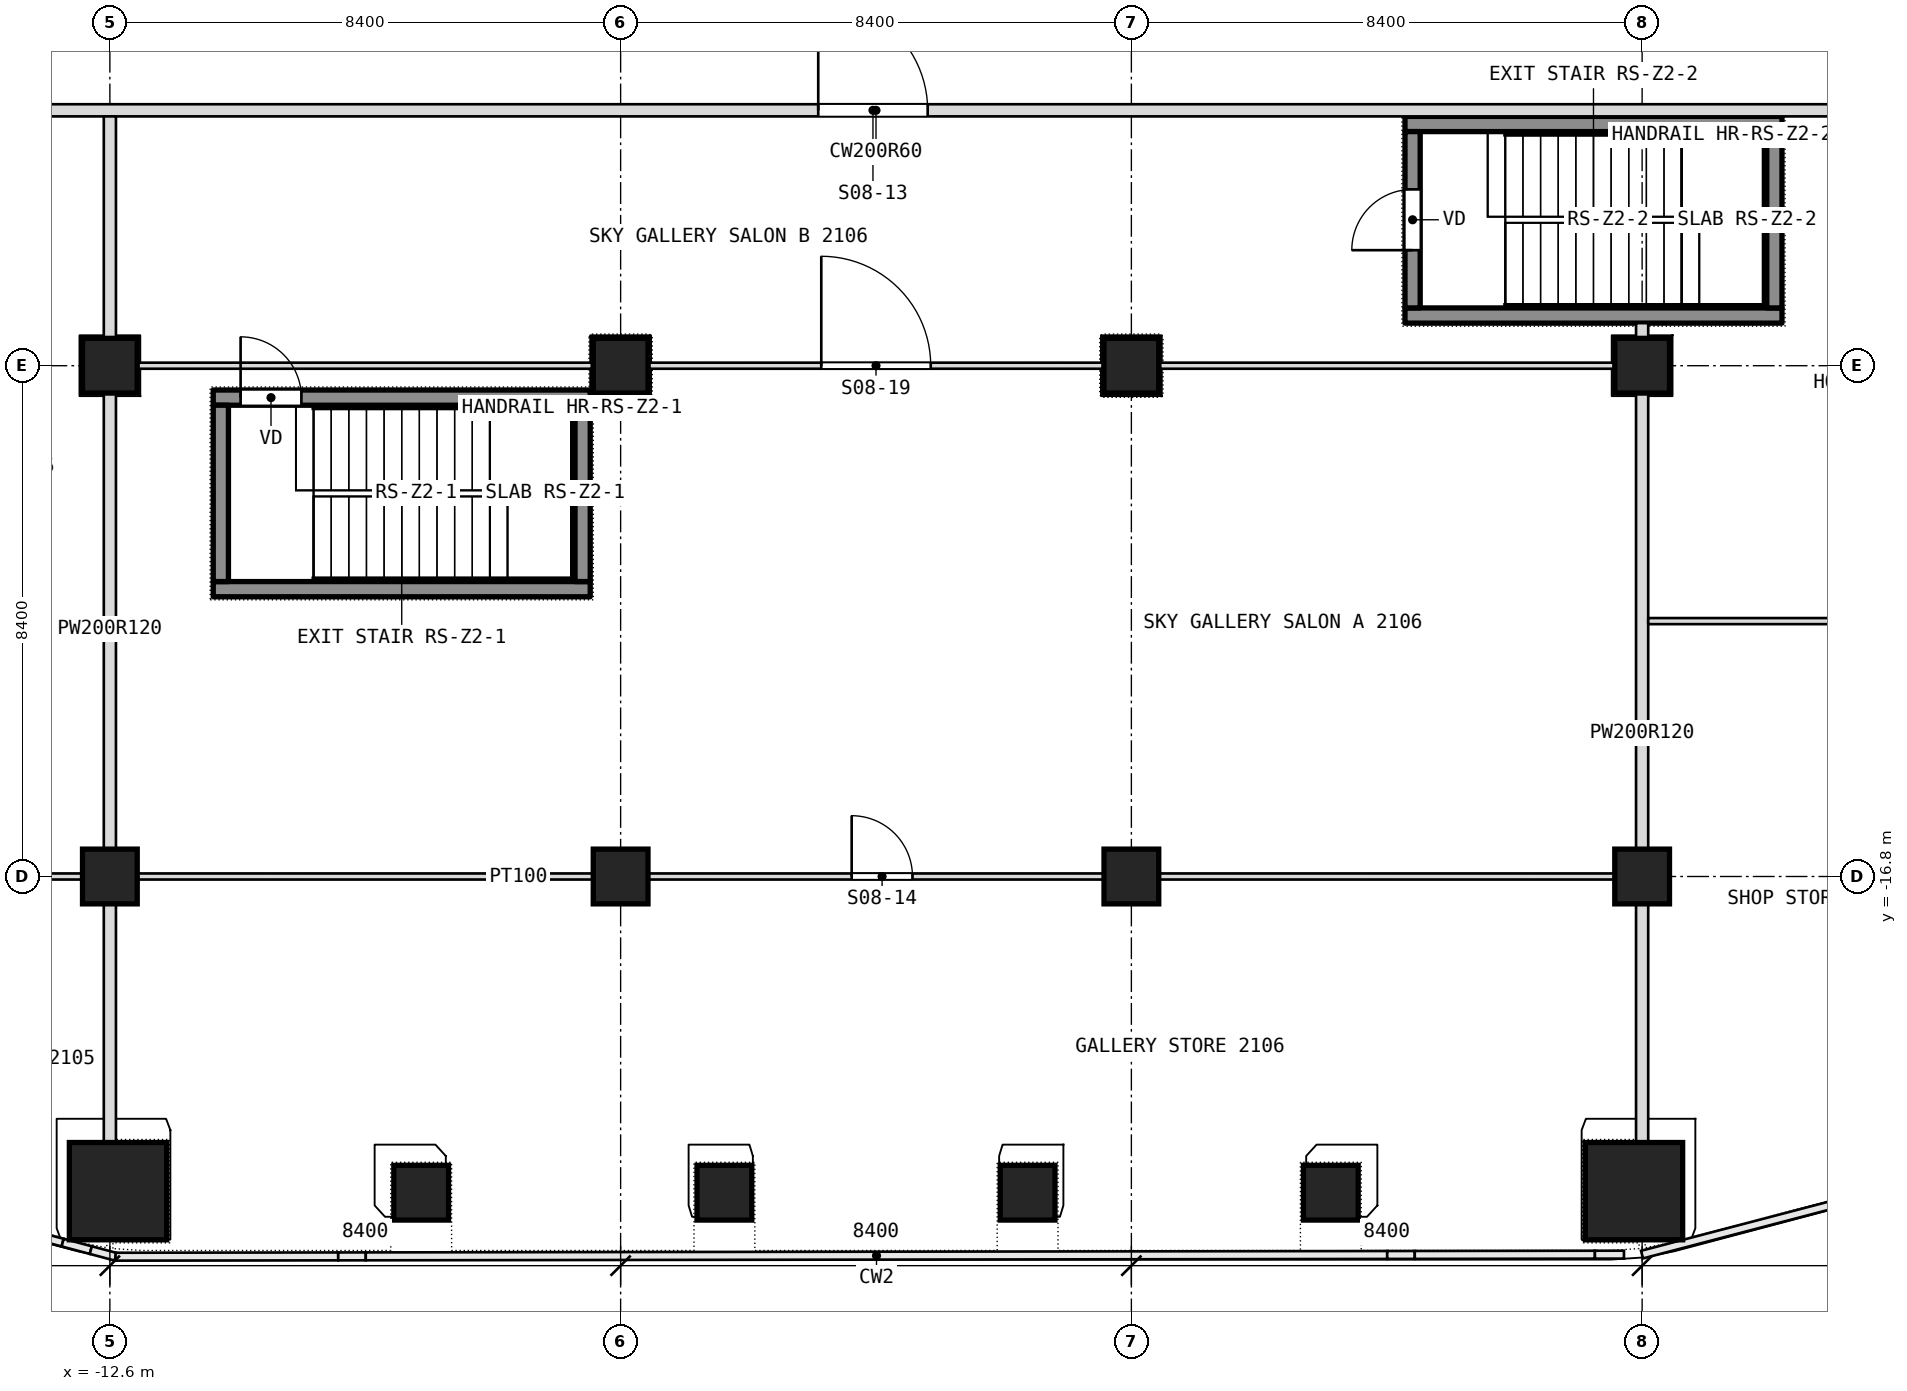
"""IFC4 building model, lengths in metres.
Left out: names, types, materials, properties, quantities, classifications, styles, units other than length and angle.
Written with IfcOpenShell. Run it as: python <this file> out.ifc"""

import sys

from ifc_helpers import new_model, si_unit, direction, frame, frame_2d, origin, origin_2d, place, context, subcontext, project, spatial, rectangle, extrude, element, fill, save


model = new_model("IFC4")
c1 = context("Model", 3, precision=1e-05, world=origin(), true_north=direction((0.0, 1.0)))
c2 = subcontext(c1, "Body", "Model", "MODEL_VIEW")
j1 = project(units=[si_unit("LENGTHUNIT", "METRE"), si_unit("PLANEANGLEUNIT", "RADIAN")], contexts=[c1])
p1 = place(None, origin())
s1 = spatial("IfcSite", under=j1, at=p1, CompositionType="ELEMENT")
p2 = place(p1, origin())
s2 = spatial("IfcBuilding", under=s1, at=p2, CompositionType="ELEMENT")
p3 = place(p2, frame((0.0, 0.0, 97.7)))
s3 = spatial("IfcBuildingStorey", under=s2, at=p3, CompositionType="ELEMENT", Elevation=97.7)
for number, where, z_axis, x_axis in (
    (1, (-12.466, -21.975, 0.0), (0.0, 0.0, 1.0), (1.0, 0.0, 0.0)),
    (2, (12.466, -21.975, 0.0), (0.0, 0.0, 1.0), (1.0, 0.0, 0.0)),
):
    element("IfcColumn", number, at=place(p3, frame(where, z_axis=z_axis, x_axis=x_axis)), inside=s3, PredefinedType="COLUMN", context=c2, shape_type="SweptSolid", body=[
        extrude(rectangle(XDim=1.6, YDim=1.6, at=origin_2d()), origin(), (0.0, 0.0, 1.0), 7.2),
    ])
p4 = place(p3, frame((-12.6, -16.8, -0.26), z_axis=(0.0, 0.0, 1.0), x_axis=(1.0, 0.0, 0.0)))
e3 = element("IfcColumn", 3, at=p4, inside=s3, PredefinedType="COLUMN", context=c2, shape_type="SweptSolid", body=[
    extrude(rectangle(XDim=0.9, YDim=0.9, at=origin_2d()), origin(), (0.0, 0.0, 1.0), 7.46),
])
p5 = place(p3, frame((-12.6, -8.4, 0.0), z_axis=(0.0, 0.0, 1.0), x_axis=(1.0, 0.0, 0.0)))
e4 = element("IfcColumn", 4, at=p5, inside=s3, PredefinedType="COLUMN", context=c2, shape_type="SweptSolid", body=[
    extrude(rectangle(XDim=0.9, YDim=0.9, at=origin_2d()), origin(), (0.0, 0.0, 1.0), 7.2),
])
p6 = place(p3, frame((-4.2, -16.8, -0.26), z_axis=(0.0, 0.0, 1.0), x_axis=(1.0, 0.0, 0.0)))
e5 = element("IfcColumn", 5, at=p6, inside=s3, PredefinedType="COLUMN", context=c2, shape_type="SweptSolid", body=[
    extrude(rectangle(XDim=0.9, YDim=0.9, at=origin_2d()), origin(), (0.0, 0.0, 1.0), 7.46),
])
p7 = place(p3, frame((-4.2, -8.4, 0.0), z_axis=(0.0, 0.0, 1.0), x_axis=(1.0, 0.0, 0.0)))
e6 = element("IfcColumn", 6, at=p7, inside=s3, PredefinedType="COLUMN", context=c2, shape_type="SweptSolid", body=[
    extrude(rectangle(XDim=0.9, YDim=0.9, at=origin_2d()), origin(), (0.0, 0.0, 1.0), 7.2),
])
p8 = place(p3, frame((4.2, -16.8, -0.26), z_axis=(0.0, 0.0, 1.0), x_axis=(1.0, 0.0, 0.0)))
e7 = element("IfcColumn", 7, at=p8, inside=s3, PredefinedType="COLUMN", context=c2, shape_type="SweptSolid", body=[
    extrude(rectangle(XDim=0.9, YDim=0.9, at=origin_2d()), origin(), (0.0, 0.0, 1.0), 7.46),
])
p9 = place(p3, frame((4.2, -8.4, 0.0), z_axis=(0.0, 0.0, 1.0), x_axis=(1.0, 0.0, 0.0)))
e8 = element("IfcColumn", 8, at=p9, inside=s3, PredefinedType="COLUMN", context=c2, shape_type="SweptSolid", body=[
    extrude(rectangle(XDim=0.9, YDim=0.9, at=origin_2d()), origin(), (0.0, 0.0, 1.0), 7.2),
])
p10 = place(p3, frame((12.6, -16.8, -0.26), z_axis=(0.0, 0.0, 1.0), x_axis=(1.0, 0.0, 0.0)))
e9 = element("IfcColumn", 9, at=p10, inside=s3, PredefinedType="COLUMN", context=c2, shape_type="SweptSolid", body=[
    extrude(rectangle(XDim=0.9, YDim=0.9, at=origin_2d()), origin(), (0.0, 0.0, 1.0), 7.46),
])
for number, where, z_axis, x_axis in (
    (10, (12.6, -8.4, 0.0), (0.0, 0.0, 1.0), (1.0, 0.0, 0.0)),
    (11, (7.48, -22.0, 0.0), (0.0, 0.0, 1.0), (1.0, 0.0, 0.0)),
    (12, (2.493, -22.0, 0.0), (0.0, 0.0, 1.0), (1.0, 0.0, 0.0)),
    (13, (-2.493, -22.0, 0.0), (0.0, 0.0, 1.0), (1.0, 0.0, 0.0)),
    (14, (-7.48, -22.0, 0.0), (0.0, 0.0, 1.0), (1.0, 0.0, 0.0)),
):
    element("IfcColumn", number, at=place(p3, frame(where, z_axis=z_axis, x_axis=x_axis)), inside=s3, PredefinedType="COLUMN", context=c2, shape_type="SweptSolid", body=[
        extrude(rectangle(XDim=0.9, YDim=0.9, at=origin_2d()), origin(), (0.0, 0.0, 1.0), 7.2),
    ])
p11 = place(p3, frame((-24.463, -16.8, 0.0), z_axis=(0.0, 0.0, 1.0), x_axis=(1.0, 0.0, 0.0)))
e15 = element("IfcWall", 15, at=p11, inside=s3, PredefinedType="PARTITIONING", context=c2, shape_type="SweptSolid", body=[
    extrude(rectangle(XDim=37.163, YDim=0.1, at=frame_2d((18.582, 0.0))), origin(), (0.0, 0.0, 1.0), 6.49),
])
p12 = place(p11, frame((7.038, 0.0, 0.0)))
e16 = element("IfcOpeningElement", 16, at=p12, cuts=e15, PredefinedType="OPENING", context=c2, shape_type="SweptSolid", body=[
    extrude(rectangle(XDim=1.2, YDim=2.1, at=frame_2d((0.6, 1.05))), frame((0.0, 0.05, 0.0), z_axis=(0.0, -1.0, 0.0), x_axis=(1.0, 0.0, 0.0)), (0.0, 0.0, 1.0), 0.1),
])
p13 = place(p11, frame((24.063, 0.0, 0.0)))
e17 = element("IfcOpeningElement", 17, at=p13, cuts=e15, PredefinedType="OPENING", context=c2, shape_type="SweptSolid", body=[
    extrude(rectangle(XDim=1.0, YDim=2.1, at=frame_2d((0.5, 1.05))), frame((0.0, 0.05, 0.0), z_axis=(0.0, -1.0, 0.0), x_axis=(1.0, 0.0, 0.0)), (0.0, 0.0, 1.0), 0.1),
])
p14 = place(p3, frame((12.6, -21.175, 0.0), z_axis=(0.0, 0.0, 1.0), x_axis=(0.0, 1.0, 0.0)))
e18 = element("IfcWall", 18, at=p14, inside=s3, PredefinedType="PARTITIONING", context=c2, shape_type="SweptSolid", body=[
    extrude(rectangle(XDim=13.475, YDim=0.2, at=frame_2d((6.738, 0.0))), origin(), (0.0, 0.0, 1.0), 6.94),
])
p15 = place(p3, frame((12.7, -12.6, 0.0), z_axis=(0.0, 0.0, 1.0), x_axis=(1.0, 0.0, 0.0)))
e19 = element("IfcWall", 19, at=p15, inside=s3, PredefinedType="PARTITIONING", context=c2, shape_type="SweptSolid", body=[
    extrude(rectangle(XDim=14.9, YDim=0.1, at=frame_2d((7.45, 0.0))), origin(), (0.0, 0.0, 1.0), 6.94),
])
p16 = place(p15, frame((3.675, 0.0, 0.0)))
e20 = element("IfcOpeningElement", 20, at=p16, cuts=e19, PredefinedType="OPENING", context=c2, shape_type="SweptSolid", body=[
    extrude(rectangle(XDim=1.0, YDim=2.1, at=frame_2d((0.5, 1.05))), frame((0.0, 0.05, 0.0), z_axis=(0.0, -1.0, 0.0), x_axis=(1.0, 0.0, 0.0)), (0.0, 0.0, 1.0), 0.1),
])
p17 = place(p3, frame((-12.5, -8.4, 0.0), z_axis=(0.0, 0.0, 1.0), x_axis=(1.0, 0.0, 0.0)))
e21 = element("IfcWall", 21, at=p17, inside=s3, PredefinedType="PARTITIONING", context=c2, shape_type="SweptSolid", body=[
    extrude(rectangle(XDim=7.83, YDim=0.1, at=frame_2d((3.915, 0.0))), origin(), (0.0, 0.0, 1.0), 6.49),
])
p18 = place(p3, frame((-3.73, -8.4, 0.0), z_axis=(0.0, 0.0, 1.0), x_axis=(1.0, 0.0, 0.0)))
e22 = element("IfcWall", 22, at=p18, inside=s3, PredefinedType="PARTITIONING", context=c2, shape_type="SweptSolid", body=[
    extrude(rectangle(XDim=7.46, YDim=0.1, at=frame_2d((3.73, 0.0))), origin(), (0.0, 0.0, 1.0), 6.49),
])
p19 = place(p18, frame((2.83, 0.0, 0.0)))
e23 = element("IfcOpeningElement", 23, at=p19, cuts=e22, PredefinedType="OPENING", context=c2, shape_type="SweptSolid", body=[
    extrude(rectangle(XDim=1.8, YDim=2.1, at=frame_2d((0.9, 1.05))), frame((0.0, 0.05, 0.0), z_axis=(0.0, -1.0, 0.0), x_axis=(1.0, 0.0, 0.0)), (0.0, 0.0, 1.0), 0.1),
])
p20 = place(p3, frame((4.67, -8.4, 0.0), z_axis=(0.0, 0.0, 1.0), x_axis=(1.0, 0.0, 0.0)))
e24 = element("IfcWall", 24, at=p20, inside=s3, PredefinedType="PARTITIONING", context=c2, shape_type="SweptSolid", body=[
    extrude(rectangle(XDim=7.83, YDim=0.1, at=frame_2d((3.915, 0.0))), origin(), (0.0, 0.0, 1.0), 6.49),
])
p21 = place(p3, frame((-27.6, -4.2, 0.0), z_axis=(0.0, 0.0, 1.0), x_axis=(1.0, 0.0, 0.0)))
e25 = element("IfcWall", 25, at=p21, inside=s3, PredefinedType="PARTITIONING", context=c2, shape_type="SweptSolid", body=[
    extrude(rectangle(XDim=55.2, YDim=0.2, at=frame_2d((27.6, 0.0))), origin(), (0.0, 0.0, 1.0), 6.94),
])
p22 = place(p21, frame((9.925, 0.0, 0.0)))
e26 = element("IfcOpeningElement", 26, at=p22, cuts=e25, PredefinedType="OPENING", context=c2, shape_type="SweptSolid", body=[
    extrude(rectangle(XDim=1.8, YDim=2.1, at=frame_2d((0.9, 1.05))), frame((0.0, 0.1, 0.0), z_axis=(0.0, -1.0, 0.0), x_axis=(1.0, 0.0, 0.0)), (0.0, 0.0, 1.0), 0.2),
])
p23 = place(p21, frame((2.725, 0.0, 0.0)))
e27 = element("IfcOpeningElement", 27, at=p23, cuts=e25, PredefinedType="OPENING", context=c2, shape_type="SweptSolid", body=[
    extrude(rectangle(XDim=1.8, YDim=2.1, at=frame_2d((0.9, 1.05))), frame((0.0, 0.1, 0.0), z_axis=(0.0, -1.0, 0.0), x_axis=(1.0, 0.0, 0.0)), (0.0, 0.0, 1.0), 0.2),
])
p24 = place(p21, frame((26.65, 0.0, 0.0)))
e28 = element("IfcOpeningElement", 28, at=p24, cuts=e25, PredefinedType="OPENING", context=c2, shape_type="SweptSolid", body=[
    extrude(rectangle(XDim=1.8, YDim=2.1, at=frame_2d((0.9, 1.05))), frame((0.0, 0.1, 0.0), z_axis=(0.0, -1.0, 0.0), x_axis=(1.0, 0.0, 0.0)), (0.0, 0.0, 1.0), 0.2),
])
p25 = place(p21, frame((43.525, 0.0, 0.0)))
e29 = element("IfcOpeningElement", 29, at=p25, cuts=e25, PredefinedType="OPENING", context=c2, shape_type="SweptSolid", body=[
    extrude(rectangle(XDim=1.8, YDim=2.1, at=frame_2d((0.9, 1.05))), frame((0.0, 0.1, 0.0), z_axis=(0.0, -1.0, 0.0), x_axis=(1.0, 0.0, 0.0)), (0.0, 0.0, 1.0), 0.2),
])
p26 = place(p21, frame((50.675, 0.0, 0.0)))
e30 = element("IfcOpeningElement", 30, at=p26, cuts=e25, PredefinedType="OPENING", context=c2, shape_type="SweptSolid", body=[
    extrude(rectangle(XDim=1.8, YDim=2.1, at=frame_2d((0.9, 1.05))), frame((0.0, 0.1, 0.0), z_axis=(0.0, -1.0, 0.0), x_axis=(1.0, 0.0, 0.0)), (0.0, 0.0, 1.0), 0.2),
])
p27 = place(p3, frame((-12.6, -21.175, 0.0), z_axis=(0.0, 0.0, 1.0), x_axis=(0.0, 1.0, 0.0)))
e31 = element("IfcWall", 31, at=p27, inside=s3, PredefinedType="PARTITIONING", context=c2, shape_type="SweptSolid", body=[
    extrude(rectangle(XDim=16.875, YDim=0.2, at=frame_2d((8.438, 0.0))), origin(), (0.0, 0.0, 1.0), 6.94),
])
p28 = place(p3, frame((-10.9, -12.075, -0.26), z_axis=(0.0, 0.0, 1.0), x_axis=(1.0, 0.0, 0.0)))
e32 = element("IfcWall", 32, at=p28, inside=s3, PredefinedType="SHEAR", context=c2, shape_type="SweptSolid", body=[
    extrude(rectangle(XDim=6.2, YDim=0.25, at=frame_2d((3.1, 0.0))), origin(), (0.0, 0.0, 1.0), 7.56),
])
p29 = place(p3, frame((-10.9, -8.925, -0.26), z_axis=(0.0, 0.0, 1.0), x_axis=(1.0, 0.0, 0.0)))
e33 = element("IfcWall", 33, at=p29, inside=s3, PredefinedType="SHEAR", context=c2, shape_type="SweptSolid", body=[
    extrude(rectangle(XDim=6.2, YDim=0.25, at=frame_2d((3.1, 0.0))), origin(), (0.0, 0.0, 1.0), 7.56),
])
p30 = place(p29, frame((0.45, 0.0, 0.0)))
e34 = element("IfcOpeningElement", 34, at=p30, cuts=e33, PredefinedType="OPENING", context=c2, shape_type="SweptSolid", body=[
    extrude(rectangle(XDim=1.0, YDim=2.1, at=frame_2d((0.5, 1.05))), frame((0.0, 0.125, 0.0), z_axis=(0.0, -1.0, 0.0), x_axis=(1.0, 0.0, 0.0)), (0.0, 0.0, 1.0), 0.25),
])
for number, where, z_axis, x_axis in (
    (35, (-10.775, -11.95, -0.26), (0.0, 0.0, 1.0), (0.0, 1.0, 0.0)),
    (36, (-4.825, -11.95, -0.26), (0.0, 0.0, 1.0), (0.0, 1.0, 0.0)),
):
    element("IfcWall", number, at=place(p3, frame(where, z_axis=z_axis, x_axis=x_axis)), inside=s3, PredefinedType="SHEAR", context=c2, shape_type="SweptSolid", body=[
        extrude(rectangle(XDim=2.9, YDim=0.25, at=frame_2d((1.45, 0.0))), origin(), (0.0, 0.0, 1.0), 7.56),
    ])
for number, where, z_axis, x_axis in (
    (37, (8.7, -7.575, -0.26), (0.0, 0.0, 1.0), (1.0, 0.0, 0.0)),
    (38, (8.7, -4.425, -0.26), (0.0, 0.0, 1.0), (1.0, 0.0, 0.0)),
):
    element("IfcWall", number, at=place(p3, frame(where, z_axis=z_axis, x_axis=x_axis)), inside=s3, PredefinedType="SHEAR", context=c2, shape_type="SweptSolid", body=[
        extrude(rectangle(XDim=6.2, YDim=0.25, at=frame_2d((3.1, 0.0))), origin(), (0.0, 0.0, 1.0), 7.56),
    ])
p31 = place(p3, frame((8.825, -7.45, -0.26), z_axis=(0.0, 0.0, 1.0), x_axis=(0.0, 1.0, 0.0)))
e39 = element("IfcWall", 39, at=p31, inside=s3, PredefinedType="SHEAR", context=c2, shape_type="SweptSolid", body=[
    extrude(rectangle(XDim=2.9, YDim=0.25, at=frame_2d((1.45, 0.0))), origin(), (0.0, 0.0, 1.0), 7.56),
])
p32 = place(p31, frame((0.95, 0.0, 0.0)))
e40 = element("IfcOpeningElement", 40, at=p32, cuts=e39, PredefinedType="OPENING", context=c2, shape_type="SweptSolid", body=[
    extrude(rectangle(XDim=1.0, YDim=2.1, at=frame_2d((0.5, 1.05))), frame((0.0, 0.125, 0.0), z_axis=(0.0, -1.0, 0.0), x_axis=(1.0, 0.0, 0.0)), (0.0, 0.0, 1.0), 0.25),
])
p33 = place(p3, frame((14.775, -7.45, -0.26), z_axis=(0.0, 0.0, 1.0), x_axis=(0.0, 1.0, 0.0)))
e41 = element("IfcWall", 41, at=p33, inside=s3, PredefinedType="SHEAR", context=c2, shape_type="SweptSolid", body=[
    extrude(rectangle(XDim=2.9, YDim=0.25, at=frame_2d((1.45, 0.0))), origin(), (0.0, 0.0, 1.0), 7.56),
])
p34 = place(p13, origin())
e42 = element("IfcDoor", 42, at=p34, inside=s3, OperationType="SINGLE_SWING_LEFT", PredefinedType="DOOR", context=c2, shape_type="SweptSolid", body=[
    extrude(rectangle(XDim=1.0, YDim=2.1, at=frame_2d((0.5, 1.05))), frame((0.0, 0.025, 0.0), z_axis=(0.0, -1.0, 0.0), x_axis=(1.0, 0.0, 0.0)), (0.0, 0.0, 1.0), 0.05),
])
fill(e17, e42)
p35 = place(p19, origin())
e43 = element("IfcDoor", 43, at=p35, inside=s3, OperationType="DOUBLE_DOOR_SINGLE_SWING", PredefinedType="DOOR", context=c2, shape_type="SweptSolid", body=[
    extrude(rectangle(XDim=1.8, YDim=2.1, at=frame_2d((0.9, 1.05))), frame((0.0, 0.025, 0.0), z_axis=(0.0, -1.0, 0.0), x_axis=(1.0, 0.0, 0.0)), (0.0, 0.0, 1.0), 0.05),
])
fill(e23, e43)
p36 = place(p24, origin())
e44 = element("IfcDoor", 44, at=p36, inside=s3, OperationType="DOUBLE_DOOR_SINGLE_SWING", PredefinedType="DOOR", context=c2, shape_type="SweptSolid", body=[
    extrude(rectangle(XDim=1.8, YDim=2.1, at=frame_2d((0.9, 1.05))), frame((0.0, 0.025, 0.0), z_axis=(0.0, -1.0, 0.0), x_axis=(1.0, 0.0, 0.0)), (0.0, 0.0, 1.0), 0.05),
])
fill(e28, e44)
p37 = place(p30, origin())
e45 = element("IfcDoor", 45, at=p37, inside=s3, OperationType="SINGLE_SWING_LEFT", PredefinedType="DOOR", context=c2, shape_type="SweptSolid", body=[
    extrude(rectangle(XDim=1.0, YDim=2.1, at=frame_2d((0.5, 1.05))), frame((0.0, 0.025, 0.0), z_axis=(0.0, -1.0, 0.0), x_axis=(1.0, 0.0, 0.0)), (0.0, 0.0, 1.0), 0.05),
])
fill(e34, e45)
p38 = place(p32, origin())
e46 = element("IfcDoor", 46, at=p38, inside=s3, OperationType="SINGLE_SWING_LEFT", PredefinedType="DOOR", context=c2, shape_type="SweptSolid", body=[
    extrude(rectangle(XDim=1.0, YDim=2.1, at=frame_2d((0.5, 1.05))), frame((0.0, 0.025, 0.0), z_axis=(0.0, -1.0, 0.0), x_axis=(1.0, 0.0, 0.0)), (0.0, 0.0, 1.0), 0.05),
])
fill(e40, e46)
save(model, sys.argv[1])
